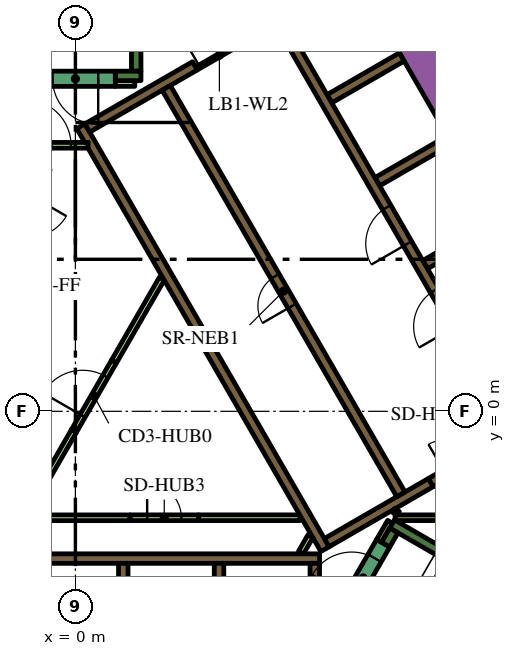
"""IFC4 building model, lengths in metres.
Left out: names, types, materials, properties, quantities, classifications, styles, units other than length and angle.
Written with IfcOpenShell. Run it as: python <this file> out.ifc"""

import sys

from ifc_helpers import new_model, si_unit, direction, frame, frame_2d, origin, place, context, subcontext, project, spatial, polyline, rectangle, outline, extrude, element, fill, save


model = new_model("IFC4")
c1 = context("Model", 3, precision=1e-05, world=origin(), true_north=direction((0.0, 1.0)))
c2 = subcontext(c1, "Body", "Model", "MODEL_VIEW")
j1 = project(units=[si_unit("LENGTHUNIT", "METRE"), si_unit("PLANEANGLEUNIT", "RADIAN")], contexts=[c1])
p1 = place(None, origin())
s1 = spatial("IfcSite", under=j1, at=p1, CompositionType="ELEMENT")
p2 = place(p1, origin())
s2 = spatial("IfcBuilding", under=s1, at=p2, CompositionType="ELEMENT")
p3 = place(p2, frame((0.0, 0.0, 62.7)))
s3 = spatial("IfcBuildingStorey", under=s2, at=p3, CompositionType="ELEMENT", Elevation=62.7)
p4 = place(p3, frame((6.776, 13.364, 0.0), z_axis=(0.0, 0.0, 1.0), x_axis=(0.500004177138, -0.8660229921, 0.0)))
e1 = element("IfcWall", 1, at=p4, inside=s3, PredefinedType="SOLIDWALL", context=c2, shape_type="SweptSolid", body=[
    extrude(rectangle(XDim=20.204, YDim=0.9, at=frame_2d((10.102, 0.0))), origin(), (0.0, 0.0, 1.0), 3.9),
])
p5 = place(p3, frame((8.334, -2.964, 0.0), z_axis=(0.0, 0.0, 1.0), x_axis=(0.866016039709, -0.500016218704, 0.0)))
e2 = element("IfcWall", 2, at=p5, inside=s3, PredefinedType="SOLIDWALL", context=c2, shape_type="SweptSolid", body=[
    extrude(rectangle(XDim=7.05, YDim=0.25, at=frame_2d((3.525, 0.0))), origin(), (0.0, 0.0, 1.0), 3.9),
])
p6 = place(p3, frame((8.163, -3.511, 0.0), z_axis=(0.0, 0.0, 1.0), x_axis=(0.500127794843, 0.865951608824, 0.0)))
e3 = element("IfcWall", 3, at=p6, inside=s3, PredefinedType="SOLIDWALL", context=c2, shape_type="SweptSolid", body=[
    extrude(rectangle(XDim=0.435, YDim=0.25, at=frame_2d((0.217, 0.0))), origin(), (0.0, 0.0, 1.0), 3.9),
])
p7 = place(p3, frame((1.6, 8.95, 0.0), z_axis=(0.0, 0.0, 1.0), x_axis=(0.0, 1.0, 0.0)))
e4 = element("IfcWall", 4, at=p7, inside=s3, PredefinedType="SOLIDWALL", context=c2, shape_type="SweptSolid", body=[
    extrude(rectangle(XDim=6.8, YDim=0.25, at=frame_2d((3.4, 0.0))), origin(), (0.0, 0.0, 1.0), 3.9),
])
p8 = place(p3, frame((1.05, 8.825, 0.0), z_axis=(0.0, 0.0, 1.0), x_axis=(1.0, 0.0, 0.0)))
e5 = element("IfcWall", 5, at=p8, inside=s3, PredefinedType="SOLIDWALL", context=c2, shape_type="SweptSolid", body=[
    extrude(rectangle(XDim=0.675, YDim=0.25, at=frame_2d((0.337, 0.0))), origin(), (0.0, 0.0, 1.0), 3.9),
])
p9 = place(p3, frame((-6.19, -3.875, 0.0), z_axis=(0.0, 0.0, 1.0), x_axis=(1.0, 0.0, 0.0)))
e6 = element("IfcWall", 6, at=p9, inside=s3, PredefinedType="SOLIDWALL", context=c2, shape_type="SweptSolid", body=[
    extrude(rectangle(XDim=12.615, YDim=0.25, at=frame_2d((6.307, 0.0))), origin(), (0.0, 0.0, 1.0), 3.9),
])
p10 = place(p3, frame((6.3, -7.268, 0.0), z_axis=(0.0, 0.0, 1.0), x_axis=(0.0, 1.0, 0.0)))
e7 = element("IfcWall", 7, at=p10, inside=s3, PredefinedType="SOLIDWALL", context=c2, shape_type="SweptSolid", body=[
    extrude(rectangle(XDim=3.268, YDim=0.25, at=frame_2d((1.634, 0.0))), origin(), (0.0, 0.0, 1.0), 3.9),
])
for number, where, z_axis, x_axis in (
    (8, (3.78, -4.0, 0.0), (0.0, 0.0, 1.0), (0.0, -1.0, 0.0)),
    (9, (1.26, -4.0, 0.0), (0.0, 0.0, 1.0), (0.0, -1.0, 0.0)),
):
    element("IfcWall", number, at=place(p3, frame(where, z_axis=z_axis, x_axis=x_axis)), inside=s3, PredefinedType="SOLIDWALL", context=c2, shape_type="SweptSolid", body=[
        extrude(rectangle(XDim=2.2, YDim=0.25, at=frame_2d((1.1, 0.0))), origin(), (0.0, 0.0, 1.0), 3.9),
    ])
p11 = place(p3, origin())
e10 = element("IfcWall", 10, at=p11, inside=s3, PredefinedType="SOLIDWALL", context=c2, shape_type="SweptSolid", body=[
    extrude(outline(polyline([(0.335, 6.925), (0.335, 6.925), (0.335, 7.075), (0.335, 7.075), (0.335, 7.075), (0.245, 7.075), (0.079, 7.363), (0.035, 7.439), (0.252, 7.564), (0.377, 7.348), (6.552, -3.348), (6.677, -3.564), (6.46, -3.689), (4.897, -0.981), (0.332, 6.925), (0.335, 6.925), (0.335, 6.925)])), origin(), (0.0, 0.0, 1.0), 3.9),
])
p12 = place(p3, frame((0.314, 7.456, 0.0), z_axis=(0.0, 0.0, 1.0), x_axis=(0.866013897511, 0.50001992892, 0.0)))
e11 = element("IfcWall", 11, at=p12, inside=s3, PredefinedType="SOLIDWALL", context=c2, shape_type="SweptSolid", body=[
    extrude(rectangle(XDim=3.268, YDim=0.25, at=frame_2d((1.634, 0.0))), origin(), (0.0, 0.0, 1.0), 3.9),
])
p13 = place(p3, frame((9.352, -1.875, 0.0), z_axis=(0.0, 0.0, 1.0), x_axis=(-0.866024844342, -0.500000968981, 0.0)))
e12 = element("IfcWall", 12, at=p13, inside=s3, PredefinedType="SOLIDWALL", context=c2, shape_type="SweptSolid", body=[
    extrude(rectangle(XDim=3.162, YDim=0.25, at=frame_2d((1.581, 0.0))), origin(), (0.0, 0.0, 1.0), 3.9),
])
for number, where, z_axis, x_axis in (
    (13, (6.684, 8.224, 0.0), (0.0, 0.0, 1.0), (0.866, 0.5, 0.0)),
    (14, (7.944, 6.041, 0.0), (0.0, 0.0, 1.0), (0.866, 0.5, 0.0)),
    (15, (9.204, 3.859, 0.0), (0.0, 0.0, 1.0), (0.866, 0.5, 0.0)),
):
    element("IfcWall", number, at=place(p3, frame(where, z_axis=z_axis, x_axis=x_axis)), inside=s3, PredefinedType="SOLIDWALL", context=c2, shape_type="SweptSolid", body=[
        extrude(rectangle(XDim=2.2, YDim=0.25, at=frame_2d((1.1, 0.0))), origin(), (0.0, 0.0, 1.0), 3.9),
    ])
p14 = place(p3, frame((-6.086, -2.801, 0.0), z_axis=(0.0, 0.0, 1.0), x_axis=(1.0, 0.0, 0.0)))
e16 = element("IfcWall", 16, at=p14, inside=s3, PredefinedType="PARTITIONING", context=c2, shape_type="SweptSolid", body=[
    extrude(rectangle(XDim=7.524, YDim=0.15, at=frame_2d((3.762, 0.0))), origin(), (0.0, 0.0, 1.0), 2.75),
])
p15 = place(p3, frame((-1.208, -2.544, 0.0), z_axis=(0.0, 0.0, 1.0), x_axis=(0.499995339376, 0.86602809458, 0.0)))
e17 = element("IfcWall", 17, at=p15, inside=s3, PredefinedType="PARTITIONING", context=c2, shape_type="SweptSolid", body=[
    extrude(rectangle(XDim=2.349, YDim=0.15, at=frame_2d((1.175, 0.0))), origin(), (0.0, 0.0, 1.0), 2.75),
])
p16 = place(p3, frame((5.936, -3.718, 0.0), z_axis=(0.0, 0.0, 1.0), x_axis=(0.499890179513, 0.866088799389, 0.0)))
e18 = element("IfcWall", 18, at=p16, inside=s3, PredefinedType="PARTITIONING", context=c2, shape_type="SweptSolid", body=[
    extrude(rectangle(XDim=0.504, YDim=0.15, at=frame_2d((0.252, 0.0))), origin(), (0.0, 0.0, 1.0), 2.75),
])
p17 = place(p3, frame((8.412, -2.8, 0.0), z_axis=(0.0, 0.0, 1.0), x_axis=(1.0, 0.0, 0.0)))
e19 = element("IfcWall", 19, at=p17, inside=s3, PredefinedType="PARTITIONING", context=c2, shape_type="SweptSolid", body=[
    extrude(rectangle(XDim=2.702, YDim=0.15, at=frame_2d((1.351, 0.0))), origin(), (0.0, 0.0, 1.0), 3.9),
])
p18 = place(p3, frame((8.459, -2.599, 0.0), z_axis=(0.0, 0.0, 1.0), x_axis=(-0.501919277433, -0.864914469148, 0.0)))
e20 = element("IfcWall", 20, at=p18, inside=s3, PredefinedType="PARTITIONING", context=c2, shape_type="SweptSolid", body=[
    extrude(rectangle(XDim=0.109, YDim=0.15, at=frame_2d((0.054, 0.0))), origin(), (0.0, 0.0, 1.0), 3.9),
])
p19 = place(p3, frame((8.281, -2.907, 0.0), z_axis=(0.0, 0.0, 1.0), x_axis=(-0.500193841991, -0.86591346013, 0.0)))
e21 = element("IfcWall", 21, at=p19, inside=s3, PredefinedType="PARTITIONING", context=c2, shape_type="SweptSolid", body=[
    extrude(rectangle(XDim=0.583, YDim=0.15, at=frame_2d((0.292, 0.0))), origin(), (0.0, 0.0, 1.0), 3.9),
])
p20 = place(p3, frame((3.238, -2.8, 0.0), z_axis=(0.0, 0.0, 1.0), x_axis=(1.0, 0.0, 0.0)))
e22 = element("IfcWall", 22, at=p20, inside=s3, PredefinedType="PARTITIONING", context=c2, shape_type="SweptSolid", body=[
    extrude(rectangle(XDim=2.672, YDim=0.15, at=frame_2d((1.336, 0.0))), origin(), (0.0, 0.0, 1.0), 2.75),
])
p21 = place(p3, frame((1.016, 1.309, 0.0), z_axis=(0.0, 0.0, 1.0), x_axis=(0.49998231768, 0.866035612436, 0.0)))
e23 = element("IfcWall", 23, at=p21, inside=s3, PredefinedType="PARTITIONING", context=c2, shape_type="SweptSolid", body=[
    extrude(rectangle(XDim=2.521, YDim=0.15, at=frame_2d((1.26, 0.0))), origin(), (0.0, 0.0, 1.0), 2.75),
])
p22 = place(p3, frame((1.05, 8.625, 0.0), z_axis=(0.0, 0.0, 1.0), x_axis=(1.0, 0.0, 0.0)))
e24 = element("IfcWall", 24, at=p22, inside=s3, PredefinedType="PARTITIONING", context=c2, shape_type="SweptSolid", body=[
    extrude(rectangle(XDim=0.514, YDim=0.15, at=frame_2d((0.257, 0.0))), origin(), (0.0, 0.0, 1.0), 2.75),
])
p23 = place(p3, frame((11.553, -0.46, 0.0), z_axis=(0.0, 0.0, 1.0), x_axis=(-0.500006514828, 0.866021642414, 0.0)))
e25 = element("IfcWall", 25, at=p23, inside=s3, PredefinedType="SOLIDWALL", context=c2, shape_type="SweptSolid", body=[
    extrude(rectangle(XDim=12.35, YDim=0.25, at=frame_2d((6.175, 0.0))), origin(), (0.0, 0.0, 1.0), 3.9),
])
p24 = place(p23, frame((0.585, 0.0, 0.0)))
e26 = element("IfcOpeningElement", 26, at=p24, cuts=e25, PredefinedType="OPENING", context=c2, shape_type="SweptSolid", body=[
    extrude(rectangle(XDim=1.1, YDim=2.1, at=frame_2d((0.55, 1.05))), frame((0.0, 0.135, 0.0), z_axis=(0.0, -1.0, 0.0), x_axis=(1.0, 0.0, 0.0)), (0.0, 0.0, 1.0), 0.27),
])
p25 = place(p23, frame((3.105, 0.0, 0.0)))
e27 = element("IfcOpeningElement", 27, at=p25, cuts=e25, PredefinedType="OPENING", context=c2, shape_type="SweptSolid", body=[
    extrude(rectangle(XDim=1.1, YDim=2.1, at=frame_2d((0.55, 1.05))), frame((0.0, 0.135, 0.0), z_axis=(0.0, -1.0, 0.0), x_axis=(1.0, 0.0, 0.0)), (0.0, 0.0, 1.0), 0.27),
])
p26 = place(p23, frame((5.625, 0.0, 0.0)))
e28 = element("IfcOpeningElement", 28, at=p26, cuts=e25, PredefinedType="OPENING", context=c2, shape_type="SweptSolid", body=[
    extrude(rectangle(XDim=1.1, YDim=2.1, at=frame_2d((0.55, 1.05))), frame((0.0, 0.135, 0.0), z_axis=(0.0, -1.0, 0.0), x_axis=(1.0, 0.0, 0.0)), (0.0, 0.0, 1.0), 0.27),
])
p27 = place(p3, frame((8.565, -2.185, 0.0), z_axis=(0.0, 0.0, 1.0), x_axis=(-0.499997954832, 0.866026584559, 0.0)))
e29 = element("IfcWall", 29, at=p27, inside=s3, PredefinedType="SOLIDWALL", context=c2, shape_type="SweptSolid", body=[
    extrude(rectangle(XDim=12.35, YDim=0.25, at=frame_2d((6.175, 0.0))), origin(), (0.0, 0.0, 1.0), 3.9),
])
p28 = place(p27, frame((5.725, 0.0, 0.0)))
e30 = element("IfcOpeningElement", 30, at=p28, cuts=e29, PredefinedType="OPENING", context=c2, shape_type="SweptSolid", body=[
    extrude(rectangle(XDim=0.9, YDim=2.1, at=frame_2d((0.45, 1.05))), frame((0.0, 0.135, 0.0), z_axis=(0.0, -1.0, 0.0), x_axis=(1.0, 0.0, 0.0)), (0.0, 0.0, 1.0), 0.27),
])
p29 = place(p3, frame((7.048, -5.292, 0.0), z_axis=(0.0, 0.0, 1.0), x_axis=(0.49994051562, 0.866059744384, 0.0)))
e31 = element("IfcWall", 31, at=p29, inside=s3, PredefinedType="SOLIDWALL", context=c2, shape_type="SweptSolid", body=[
    extrude(rectangle(XDim=2.1, YDim=0.4, at=frame_2d((1.05, 0.0))), origin(), (0.0, 0.0, 1.0), 3.9),
])
p30 = place(p29, frame((0.45, 0.0, 0.0)))
e32 = element("IfcOpeningElement", 32, at=p30, cuts=e31, PredefinedType="OPENING", context=c2, shape_type="SweptSolid", body=[
    extrude(rectangle(XDim=1.2, YDim=2.1, at=frame_2d((0.6, 1.05))), frame((0.0, 0.21, 0.0), z_axis=(0.0, -1.0, 0.0), x_axis=(1.0, 0.0, 0.0)), (0.0, 0.0, 1.0), 0.42),
])
p31 = place(p3, frame((1.05, 8.75, 0.0), z_axis=(0.0, 0.0, 1.0), x_axis=(-1.0, 0.0, 0.0)))
e33 = element("IfcWall", 33, at=p31, inside=s3, PredefinedType="SOLIDWALL", context=c2, shape_type="SweptSolid", body=[
    extrude(rectangle(XDim=2.1, YDim=0.4, at=frame_2d((1.05, 0.0))), origin(), (0.0, 0.0, 1.0), 3.9),
])
p32 = place(p31, frame((0.45, 0.0, 0.0)))
e34 = element("IfcOpeningElement", 34, at=p32, cuts=e33, PredefinedType="OPENING", context=c2, shape_type="SweptSolid", body=[
    extrude(rectangle(XDim=1.2, YDim=2.1, at=frame_2d((0.6, 1.05))), frame((0.0, 0.21, 0.0), z_axis=(0.0, -1.0, 0.0), x_axis=(1.0, 0.0, 0.0)), (0.0, 0.0, 1.0), 0.42),
])
p33 = place(p3, frame((-1.765, 7.0, 0.0), z_axis=(0.0, 0.0, 1.0), x_axis=(1.0, 0.0, 0.0)))
e35 = element("IfcWall", 35, at=p33, inside=s3, PredefinedType="PARTITIONING", context=c2, shape_type="SweptSolid", body=[
    extrude(rectangle(XDim=2.1, YDim=0.15, at=frame_2d((1.05, 0.0))), origin(), (0.0, 0.0, 1.0), 2.75),
])
p34 = place(p33, frame((0.45, 0.0, 0.0)))
e36 = element("IfcOpeningElement", 36, at=p34, cuts=e35, PredefinedType="OPENING", context=c2, shape_type="SweptSolid", body=[
    extrude(rectangle(XDim=1.2, YDim=2.1, at=frame_2d((0.6, 1.05))), frame((0.0, 0.085, 0.0), z_axis=(0.0, -1.0, 0.0), x_axis=(1.0, 0.0, 0.0)), (0.0, 0.0, 1.0), 0.17),
])
p35 = place(p3, frame((-0.034, -0.509, 0.0), z_axis=(0.0, 0.0, 1.0), x_axis=(0.49994051562, 0.866059744384, 0.0)))
e37 = element("IfcWall", 37, at=p35, inside=s3, PredefinedType="PARTITIONING", context=c2, shape_type="SweptSolid", body=[
    extrude(rectangle(XDim=2.1, YDim=0.15, at=frame_2d((1.05, 0.0))), origin(), (0.0, 0.0, 1.0), 2.75),
])
p36 = place(p35, frame((0.45, 0.0, 0.0)))
e38 = element("IfcOpeningElement", 38, at=p36, cuts=e37, PredefinedType="OPENING", context=c2, shape_type="SweptSolid", body=[
    extrude(rectangle(XDim=1.2, YDim=2.1, at=frame_2d((0.6, 1.05))), frame((0.0, 0.085, 0.0), z_axis=(0.0, -1.0, 0.0), x_axis=(1.0, 0.0, 0.0)), (0.0, 0.0, 1.0), 0.17),
])
p37 = place(p3, frame((3.183, 9.02, 0.0), z_axis=(0.0, 0.0, 1.0), x_axis=(0.866034573852, 0.49998411664, 0.0)))
e39 = element("IfcWall", 39, at=p37, inside=s3, PredefinedType="PARTITIONING", context=c2, shape_type="SweptSolid", body=[
    extrude(rectangle(XDim=1.4, YDim=0.09, at=frame_2d((0.7, 0.0))), origin(), (0.0, 0.0, 1.0), 2.75),
])
p38 = place(p37, frame((0.1, 0.0, 0.0)))
e40 = element("IfcOpeningElement", 40, at=p38, cuts=e39, PredefinedType="OPENING", context=c2, shape_type="SweptSolid", body=[
    extrude(rectangle(XDim=1.2, YDim=2.1, at=frame_2d((0.6, 1.05))), frame((0.0, 0.055, 0.0), z_axis=(0.0, -1.0, 0.0), x_axis=(1.0, 0.0, 0.0)), (0.0, 0.0, 1.0), 0.11),
])
p39 = place(p3, frame((9.352, -1.875, 0.0), z_axis=(0.0, 0.0, 1.0), x_axis=(0.865989075817, 0.500062916607, 0.0)))
e41 = element("IfcWall", 41, at=p39, inside=s3, PredefinedType="SOLIDWALL", context=c2, shape_type="SweptSolid", body=[
    extrude(rectangle(XDim=1.8, YDim=0.25, at=frame_2d((0.9, 0.0))), origin(), (0.0, 0.0, 1.0), 3.9),
])
p40 = place(p39, frame((0.45, 0.0, 0.0)))
e42 = element("IfcOpeningElement", 42, at=p40, cuts=e41, PredefinedType="OPENING", context=c2, shape_type="SweptSolid", body=[
    extrude(rectangle(XDim=0.9, YDim=2.1, at=frame_2d((0.45, 1.05))), frame((0.0, 0.135, 0.0), z_axis=(0.0, -1.0, 0.0), x_axis=(1.0, 0.0, 0.0)), (0.0, 0.0, 1.0), 0.27),
])
p41 = place(p3, frame((1.438, -2.8, 0.0), z_axis=(0.0, 0.0, 1.0), x_axis=(1.0, 0.0, 0.0)))
e43 = element("IfcWall", 43, at=p41, inside=s3, PredefinedType="PARTITIONING", context=c2, shape_type="SweptSolid", body=[
    extrude(rectangle(XDim=1.8, YDim=0.15, at=frame_2d((0.9, 0.0))), origin(), (0.0, 0.0, 1.0), 2.75),
])
p42 = place(p41, frame((0.45, 0.0, 0.0)))
e44 = element("IfcOpeningElement", 44, at=p42, cuts=e43, PredefinedType="OPENING", context=c2, shape_type="SweptSolid", body=[
    extrude(rectangle(XDim=0.9, YDim=2.1, at=frame_2d((0.45, 1.05))), frame((0.0, 0.085, 0.0), z_axis=(0.0, -1.0, 0.0), x_axis=(1.0, 0.0, 0.0)), (0.0, 0.0, 1.0), 0.17),
])
p43 = place(p3, frame((6.163, 18.475, 0.0), z_axis=(0.0, 0.0, 1.0), x_axis=(0.500001317485, -0.866024643133, 0.0)))
e45 = element("IfcWall", 45, at=p43, inside=s3, PredefinedType="PARTITIONING", context=c2, shape_type="SweptSolid", body=[
    extrude(rectangle(XDim=25.767, YDim=0.15, at=frame_2d((12.883, 0.0))), origin(), (0.0, 0.0, 1.0), 2.75),
])
p44 = place(p43, frame((21.138, 0.0, 0.0)))
e46 = element("IfcOpeningElement", 46, at=p44, cuts=e45, PredefinedType="OPENING", context=c2, shape_type="SweptSolid", body=[
    extrude(rectangle(XDim=1.0, YDim=2.1, at=frame_2d((0.5, 1.05))), frame((0.0, 0.085, 0.0), z_axis=(0.0, -1.0, 0.0), x_axis=(1.0, 0.0, 0.0)), (0.0, 0.0, 1.0), 0.17),
])
p45 = place(p43, frame((9.948, 0.0, 0.0)))
e47 = element("IfcOpeningElement", 47, at=p45, cuts=e45, PredefinedType="OPENING", context=c2, shape_type="SweptSolid", body=[
    extrude(rectangle(XDim=1.1, YDim=2.1, at=frame_2d((0.55, 1.05))), frame((0.0, 0.085, 0.0), z_axis=(0.0, -1.0, 0.0), x_axis=(1.0, 0.0, 0.0)), (0.0, 0.0, 1.0), 0.17),
])
p46 = place(p43, frame((8.641, 0.0, 0.0)))
e48 = element("IfcOpeningElement", 48, at=p46, cuts=e45, PredefinedType="OPENING", context=c2, shape_type="SweptSolid", body=[
    extrude(rectangle(XDim=1.0, YDim=2.1, at=frame_2d((0.5, 1.05))), frame((0.0, 0.085, 0.0), z_axis=(0.0, -1.0, 0.0), x_axis=(1.0, 0.0, 0.0)), (0.0, 0.0, 1.0), 0.17),
])
p47 = place(p43, frame((0.18, 0.0, 0.0)))
e49 = element("IfcOpeningElement", 49, at=p47, cuts=e45, PredefinedType="OPENING", context=c2, shape_type="SweptSolid", body=[
    extrude(rectangle(XDim=1.0, YDim=2.1, at=frame_2d((0.5, 1.05))), frame((0.0, 0.085, 0.0), z_axis=(0.0, -1.0, 0.0), x_axis=(1.0, 0.0, 0.0)), (0.0, 0.0, 1.0), 0.17),
])
p48 = place(p25, origin())
e50 = element("IfcDoor", 50, at=p48, inside=s3, OperationType="DOUBLE_DOOR_SLIDING", PredefinedType="DOOR", context=c2, shape_type="SweptSolid", body=[
    extrude(rectangle(XDim=1.1, YDim=2.1, at=frame_2d((0.55, 1.05))), frame((0.0, 0.025, 0.0), z_axis=(0.0, -1.0, 0.0), x_axis=(1.0, 0.0, 0.0)), (0.0, 0.0, 1.0), 0.05),
])
fill(e27, e50)
p49 = place(p26, origin())
e51 = element("IfcDoor", 51, at=p49, inside=s3, OperationType="DOUBLE_DOOR_SLIDING", PredefinedType="DOOR", context=c2, shape_type="SweptSolid", body=[
    extrude(rectangle(XDim=1.1, YDim=2.1, at=frame_2d((0.55, 1.05))), frame((0.0, 0.025, 0.0), z_axis=(0.0, -1.0, 0.0), x_axis=(1.0, 0.0, 0.0)), (0.0, 0.0, 1.0), 0.05),
])
fill(e28, e51)
p50 = place(p28, origin())
e52 = element("IfcDoor", 52, at=p50, inside=s3, OperationType="SINGLE_SWING_LEFT", PredefinedType="DOOR", context=c2, shape_type="SweptSolid", body=[
    extrude(rectangle(XDim=0.9, YDim=2.1, at=frame_2d((0.45, 1.05))), frame((0.0, 0.025, 0.0), z_axis=(0.0, -1.0, 0.0), x_axis=(1.0, 0.0, 0.0)), (0.0, 0.0, 1.0), 0.05),
])
fill(e30, e52)
p51 = place(p30, origin())
e53 = element("IfcDoor", 53, at=p51, inside=s3, OperationType="SINGLE_SWING_LEFT", PredefinedType="DOOR", context=c2, shape_type="SweptSolid", body=[
    extrude(rectangle(XDim=1.2, YDim=2.1, at=frame_2d((0.6, 1.05))), frame((0.0, 0.025, 0.0), z_axis=(0.0, -1.0, 0.0), x_axis=(1.0, 0.0, 0.0)), (0.0, 0.0, 1.0), 0.05),
])
fill(e32, e53)
p52 = place(p32, origin())
e54 = element("IfcDoor", 54, at=p52, inside=s3, OperationType="SINGLE_SWING_LEFT", PredefinedType="DOOR", context=c2, shape_type="SweptSolid", body=[
    extrude(rectangle(XDim=1.2, YDim=2.1, at=frame_2d((0.6, 1.05))), frame((0.0, 0.025, 0.0), z_axis=(0.0, -1.0, 0.0), x_axis=(1.0, 0.0, 0.0)), (0.0, 0.0, 1.0), 0.05),
])
fill(e34, e54)
p53 = place(p34, origin())
e55 = element("IfcDoor", 55, at=p53, inside=s3, OperationType="SINGLE_SWING_LEFT", PredefinedType="DOOR", context=c2, shape_type="SweptSolid", body=[
    extrude(rectangle(XDim=1.2, YDim=2.1, at=frame_2d((0.6, 1.05))), frame((0.0, 0.025, 0.0), z_axis=(0.0, -1.0, 0.0), x_axis=(1.0, 0.0, 0.0)), (0.0, 0.0, 1.0), 0.05),
])
fill(e36, e55)
p54 = place(p36, origin())
e56 = element("IfcDoor", 56, at=p54, inside=s3, OperationType="SINGLE_SWING_LEFT", PredefinedType="DOOR", context=c2, shape_type="SweptSolid", body=[
    extrude(rectangle(XDim=1.2, YDim=2.1, at=frame_2d((0.6, 1.05))), frame((0.0, 0.025, 0.0), z_axis=(0.0, -1.0, 0.0), x_axis=(1.0, 0.0, 0.0)), (0.0, 0.0, 1.0), 0.05),
])
fill(e38, e56)
p55 = place(p38, origin())
e57 = element("IfcDoor", 57, at=p55, inside=s3, OperationType="SINGLE_SWING_LEFT", PredefinedType="DOOR", context=c2, shape_type="SweptSolid", body=[
    extrude(rectangle(XDim=1.2, YDim=2.1, at=frame_2d((0.6, 1.05))), frame((0.0, 0.025, 0.0), z_axis=(0.0, -1.0, 0.0), x_axis=(1.0, 0.0, 0.0)), (0.0, 0.0, 1.0), 0.05),
])
fill(e40, e57)
p56 = place(p42, origin())
e58 = element("IfcDoor", 58, at=p56, inside=s3, OperationType="SINGLE_SWING_LEFT", PredefinedType="DOOR", context=c2, shape_type="SweptSolid", body=[
    extrude(rectangle(XDim=0.9, YDim=2.1, at=frame_2d((0.45, 1.05))), frame((0.0, 0.025, 0.0), z_axis=(0.0, -1.0, 0.0), x_axis=(1.0, 0.0, 0.0)), (0.0, 0.0, 1.0), 0.05),
])
fill(e44, e58)
save(model, sys.argv[1])
